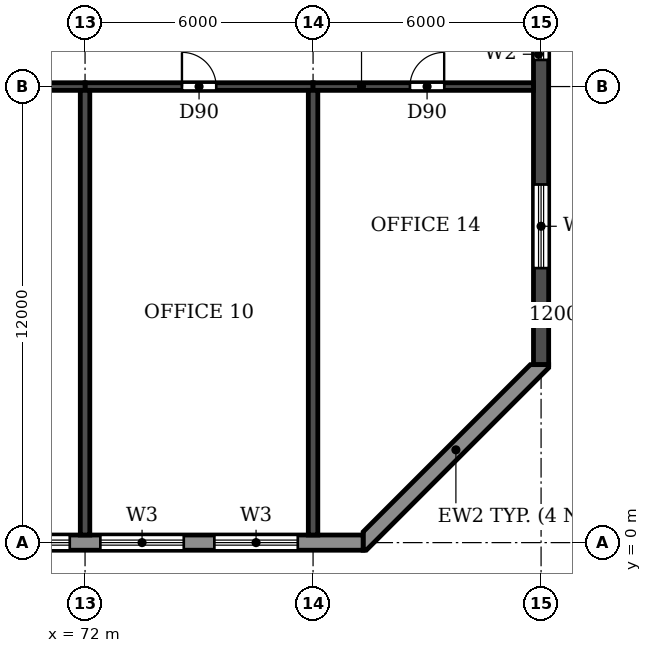
"""IFC4 building model, lengths in metres.
Left out: names, types, materials, properties, quantities, classifications, styles, units other than length and angle.
Written with IfcOpenShell. Run it as: python <this file> out.ifc"""

import sys

from ifc_helpers import new_model, si_unit, direction, frame, frame_2d, origin, place, context, subcontext, project, spatial, polyline, rectangle, outline, extrude, element, fill, save


model = new_model("IFC4")
c1 = context("Model", 3, precision=1e-05, world=origin(), true_north=direction((0.0, 1.0)))
c2 = subcontext(c1, "Body", "Model", "MODEL_VIEW")
j1 = project(units=[si_unit("LENGTHUNIT", "METRE"), si_unit("PLANEANGLEUNIT", "RADIAN")], contexts=[c1])
p1 = place(None, origin())
s1 = spatial("IfcSite", under=j1, at=p1, CompositionType="ELEMENT")
p2 = place(p1, origin())
s2 = spatial("IfcBuilding", under=s1, at=p2, CompositionType="ELEMENT")
p3 = place(p2, frame((0.0, 0.0, 261.0)))
s3 = spatial("IfcBuildingStorey", under=s2, at=p3, CompositionType="ELEMENT", Elevation=261.0)
for number, where, z_axis, x_axis in (
    (1, (72.0, 0.2, 0.0), (0.0, 0.0, 1.0), (0.0, 1.0, 0.0)),
    (2, (78.0, 0.2, 0.0), (0.0, 0.0, 1.0), (0.0, 1.0, 0.0)),
):
    element("IfcWall", number, at=place(p3, frame(where, z_axis=z_axis, x_axis=x_axis)), inside=s3, PredefinedType="SHEAR", context=c2, shape_type="SweptSolid", body=[
        extrude(rectangle(XDim=11.7, YDim=0.25, at=frame_2d((5.85, 0.0))), origin(), (0.0, 0.0, 1.0), 5.7),
    ])
p4 = place(p3, frame((84.0, 4.683, 0.0), z_axis=(0.0, 0.0, 1.0), x_axis=(0.0, 1.0, 0.0)))
e3 = element("IfcWall", 3, at=p4, inside=s3, PredefinedType="SHEAR", context=c2, shape_type="SweptSolid", body=[
    extrude(rectangle(XDim=31.834, YDim=0.4, at=frame_2d((15.917, 0.0))), origin(), (0.0, 0.0, 1.0), 5.7),
])
p5 = place(p4, frame((23.817, 0.0, 0.9)))
e4 = element("IfcOpeningElement", 4, at=p5, cuts=e3, PredefinedType="OPENING", context=c2, shape_type="SweptSolid", body=[
    extrude(rectangle(XDim=1.2, YDim=1.5, at=frame_2d((0.6, 0.75))), frame((0.0, 0.21, 0.0), z_axis=(0.0, -1.0, 0.0), x_axis=(1.0, 0.0, 0.0)), (0.0, 0.0, 1.0), 0.42),
])
p6 = place(p4, frame((8.017, 0.0, 0.9)))
e5 = element("IfcOpeningElement", 5, at=p6, cuts=e3, PredefinedType="OPENING", context=c2, shape_type="SweptSolid", body=[
    extrude(rectangle(XDim=1.2, YDim=1.5, at=frame_2d((0.6, 0.75))), frame((0.0, 0.21, 0.0), z_axis=(0.0, -1.0, 0.0), x_axis=(1.0, 0.0, 0.0)), (0.0, 0.0, 1.0), 0.42),
])
p7 = place(p4, frame((27.694, 0.0, 0.6)))
e6 = element("IfcOpeningElement", 6, at=p7, cuts=e3, PredefinedType="OPENING", context=c2, shape_type="SweptSolid", body=[
    extrude(rectangle(XDim=2.2, YDim=1.8, at=frame_2d((1.1, 0.9))), frame((0.0, 0.21, 0.0), z_axis=(0.0, -1.0, 0.0), x_axis=(1.0, 0.0, 0.0)), (0.0, 0.0, 1.0), 0.42),
])
p8 = place(p4, frame((2.541, 0.0, 0.6)))
e7 = element("IfcOpeningElement", 7, at=p8, cuts=e3, PredefinedType="OPENING", context=c2, shape_type="SweptSolid", body=[
    extrude(rectangle(XDim=2.2, YDim=1.8, at=frame_2d((1.1, 0.9))), frame((0.0, 0.21, 0.0), z_axis=(0.0, -1.0, 0.0), x_axis=(1.0, 0.0, 0.0)), (0.0, 0.0, 1.0), 0.42),
])
p9 = place(p4, frame((15.917, 0.0, 0.9)))
e8 = element("IfcOpeningElement", 8, at=p9, cuts=e3, PredefinedType="OPENING", context=c2, shape_type="SweptSolid", body=[
    extrude(rectangle(XDim=1.2, YDim=1.5, at=frame_2d((0.6, 0.75))), frame((0.0, 0.21, 0.0), z_axis=(0.0, -1.0, 0.0), x_axis=(1.0, 0.0, 0.0)), (0.0, 0.0, 1.0), 0.42),
])
p10 = place(p3, frame((66.0, 12.0, 0.0), z_axis=(0.0, 0.0, 1.0), x_axis=(1.0, 0.0, 0.0)))
e9 = element("IfcWall", 9, at=p10, inside=s3, PredefinedType="SHEAR", context=c2, shape_type="SweptSolid", body=[
    extrude(rectangle(XDim=6.0, YDim=0.2, at=frame_2d((3.0, 0.0))), origin(), (0.0, 0.0, 1.0), 5.1),
])
p11 = place(p10, frame((2.55, 0.0, 0.0)))
e10 = element("IfcOpeningElement", 10, at=p11, cuts=e9, PredefinedType="OPENING", context=c2, shape_type="SweptSolid", body=[
    extrude(rectangle(XDim=0.9, YDim=2.1, at=frame_2d((0.45, 1.05))), frame((0.0, 0.11, 0.0), z_axis=(0.0, -1.0, 0.0), x_axis=(1.0, 0.0, 0.0)), (0.0, 0.0, 1.0), 0.22),
])
p12 = place(p3, frame((72.0, 12.0, 0.0), z_axis=(0.0, 0.0, 1.0), x_axis=(1.0, 0.0, 0.0)))
e11 = element("IfcWall", 11, at=p12, inside=s3, PredefinedType="SHEAR", context=c2, shape_type="SweptSolid", body=[
    extrude(rectangle(XDim=6.0, YDim=0.2, at=frame_2d((3.0, 0.0))), origin(), (0.0, 0.0, 1.0), 5.1),
])
p13 = place(p12, frame((2.55, 0.0, 0.0)))
e12 = element("IfcOpeningElement", 12, at=p13, cuts=e11, PredefinedType="OPENING", context=c2, shape_type="SweptSolid", body=[
    extrude(rectangle(XDim=0.9, YDim=2.1, at=frame_2d((0.45, 1.05))), frame((0.0, 0.11, 0.0), z_axis=(0.0, -1.0, 0.0), x_axis=(1.0, 0.0, 0.0)), (0.0, 0.0, 1.0), 0.22),
])
p14 = place(p3, frame((78.0, 12.0, 0.0), z_axis=(0.0, 0.0, 1.0), x_axis=(1.0, 0.0, 0.0)))
e13 = element("IfcWall", 13, at=p14, inside=s3, PredefinedType="SHEAR", context=c2, shape_type="SweptSolid", body=[
    extrude(rectangle(XDim=5.8, YDim=0.2, at=frame_2d((2.9, 0.0))), origin(), (0.0, 0.0, 1.0), 5.1),
])
p15 = place(p14, frame((2.55, 0.0, 0.0)))
e14 = element("IfcOpeningElement", 14, at=p15, cuts=e13, PredefinedType="OPENING", context=c2, shape_type="SweptSolid", body=[
    extrude(rectangle(XDim=0.9, YDim=2.1, at=frame_2d((0.45, 1.05))), frame((0.0, 0.11, 0.0), z_axis=(0.0, -1.0, 0.0), x_axis=(1.0, 0.0, 0.0)), (0.0, 0.0, 1.0), 0.22),
])
p16 = place(p3, frame((22.683, 0.0, 0.0), z_axis=(0.0, 0.0, 1.0), x_axis=(1.0, 0.0, 0.0)))
e15 = element("IfcWall", 15, at=p16, inside=s3, PredefinedType="STANDARD", context=c2, shape_type="SweptSolid", body=[
    extrude(rectangle(XDim=56.634, YDim=0.4, at=frame_2d((28.317, 0.0))), origin(), (0.0, 0.0, 1.0), 5.7),
])
p17 = place(p16, frame((1.717, 0.0, 0.6)))
e16 = element("IfcOpeningElement", 16, at=p17, cuts=e15, PredefinedType="OPENING", context=c2, shape_type="SweptSolid", body=[
    extrude(rectangle(XDim=2.2, YDim=1.8, at=frame_2d((1.1, 0.9))), frame((0.0, 0.21, 0.0), z_axis=(0.0, -1.0, 0.0), x_axis=(1.0, 0.0, 0.0)), (0.0, 0.0, 1.0), 0.42),
])
p18 = place(p16, frame((4.717, 0.0, 0.6)))
e17 = element("IfcOpeningElement", 17, at=p18, cuts=e15, PredefinedType="OPENING", context=c2, shape_type="SweptSolid", body=[
    extrude(rectangle(XDim=2.2, YDim=1.8, at=frame_2d((1.1, 0.9))), frame((0.0, 0.21, 0.0), z_axis=(0.0, -1.0, 0.0), x_axis=(1.0, 0.0, 0.0)), (0.0, 0.0, 1.0), 0.42),
])
p19 = place(p16, frame((25.717, 0.0, 0.6)))
e18 = element("IfcOpeningElement", 18, at=p19, cuts=e15, PredefinedType="OPENING", context=c2, shape_type="SweptSolid", body=[
    extrude(rectangle(XDim=2.2, YDim=1.8, at=frame_2d((1.1, 0.9))), frame((0.0, 0.21, 0.0), z_axis=(0.0, -1.0, 0.0), x_axis=(1.0, 0.0, 0.0)), (0.0, 0.0, 1.0), 0.42),
])
p20 = place(p16, frame((28.717, 0.0, 0.6)))
e19 = element("IfcOpeningElement", 19, at=p20, cuts=e15, PredefinedType="OPENING", context=c2, shape_type="SweptSolid", body=[
    extrude(rectangle(XDim=2.2, YDim=1.8, at=frame_2d((1.1, 0.9))), frame((0.0, 0.21, 0.0), z_axis=(0.0, -1.0, 0.0), x_axis=(1.0, 0.0, 0.0)), (0.0, 0.0, 1.0), 0.42),
])
p21 = place(p16, frame((31.717, 0.0, 0.6)))
e20 = element("IfcOpeningElement", 20, at=p21, cuts=e15, PredefinedType="OPENING", context=c2, shape_type="SweptSolid", body=[
    extrude(rectangle(XDim=2.2, YDim=1.8, at=frame_2d((1.1, 0.9))), frame((0.0, 0.21, 0.0), z_axis=(0.0, -1.0, 0.0), x_axis=(1.0, 0.0, 0.0)), (0.0, 0.0, 1.0), 0.42),
])
p22 = place(p16, frame((34.717, 0.0, 0.6)))
e21 = element("IfcOpeningElement", 21, at=p22, cuts=e15, PredefinedType="OPENING", context=c2, shape_type="SweptSolid", body=[
    extrude(rectangle(XDim=2.2, YDim=1.8, at=frame_2d((1.1, 0.9))), frame((0.0, 0.21, 0.0), z_axis=(0.0, -1.0, 0.0), x_axis=(1.0, 0.0, 0.0)), (0.0, 0.0, 1.0), 0.42),
])
p23 = place(p16, frame((37.717, 0.0, 0.6)))
e22 = element("IfcOpeningElement", 22, at=p23, cuts=e15, PredefinedType="OPENING", context=c2, shape_type="SweptSolid", body=[
    extrude(rectangle(XDim=2.2, YDim=1.8, at=frame_2d((1.1, 0.9))), frame((0.0, 0.21, 0.0), z_axis=(0.0, -1.0, 0.0), x_axis=(1.0, 0.0, 0.0)), (0.0, 0.0, 1.0), 0.42),
])
p24 = place(p16, frame((40.717, 0.0, 0.6)))
e23 = element("IfcOpeningElement", 23, at=p24, cuts=e15, PredefinedType="OPENING", context=c2, shape_type="SweptSolid", body=[
    extrude(rectangle(XDim=2.2, YDim=1.8, at=frame_2d((1.1, 0.9))), frame((0.0, 0.21, 0.0), z_axis=(0.0, -1.0, 0.0), x_axis=(1.0, 0.0, 0.0)), (0.0, 0.0, 1.0), 0.42),
])
p25 = place(p16, frame((43.717, 0.0, 0.6)))
e24 = element("IfcOpeningElement", 24, at=p25, cuts=e15, PredefinedType="OPENING", context=c2, shape_type="SweptSolid", body=[
    extrude(rectangle(XDim=2.2, YDim=1.8, at=frame_2d((1.1, 0.9))), frame((0.0, 0.21, 0.0), z_axis=(0.0, -1.0, 0.0), x_axis=(1.0, 0.0, 0.0)), (0.0, 0.0, 1.0), 0.42),
])
p26 = place(p16, frame((46.717, 0.0, 0.6)))
e25 = element("IfcOpeningElement", 25, at=p26, cuts=e15, PredefinedType="OPENING", context=c2, shape_type="SweptSolid", body=[
    extrude(rectangle(XDim=2.2, YDim=1.8, at=frame_2d((1.1, 0.9))), frame((0.0, 0.21, 0.0), z_axis=(0.0, -1.0, 0.0), x_axis=(1.0, 0.0, 0.0)), (0.0, 0.0, 1.0), 0.42),
])
p27 = place(p16, frame((49.717, 0.0, 0.6)))
e26 = element("IfcOpeningElement", 26, at=p27, cuts=e15, PredefinedType="OPENING", context=c2, shape_type="SweptSolid", body=[
    extrude(rectangle(XDim=2.2, YDim=1.8, at=frame_2d((1.1, 0.9))), frame((0.0, 0.21, 0.0), z_axis=(0.0, -1.0, 0.0), x_axis=(1.0, 0.0, 0.0)), (0.0, 0.0, 1.0), 0.42),
])
p28 = place(p16, frame((52.717, 0.0, 0.6)))
e27 = element("IfcOpeningElement", 27, at=p28, cuts=e15, PredefinedType="OPENING", context=c2, shape_type="SweptSolid", body=[
    extrude(rectangle(XDim=2.2, YDim=1.8, at=frame_2d((1.1, 0.9))), frame((0.0, 0.21, 0.0), z_axis=(0.0, -1.0, 0.0), x_axis=(1.0, 0.0, 0.0)), (0.0, 0.0, 1.0), 0.42),
])
p29 = place(p3, origin())
e28 = element("IfcWall", 28, at=p29, inside=s3, PredefinedType="STANDARD", context=c2, shape_type="SweptSolid", body=[
    extrude(outline(polyline([(79.317, -0.2), (79.4, -0.2), (84.2, 4.6), (84.2, 4.683), (83.717, 4.683), (79.317, 0.283), (79.317, -0.2)])), origin(), (0.0, 0.0, 1.0), 5.7),
])
p30 = place(p26, origin())
e29 = element("IfcWindow", 29, at=p30, inside=s3, PartitioningType="DOUBLE_PANEL_HORIZONTAL", PredefinedType="WINDOW", context=c2, shape_type="SweptSolid", body=[
    extrude(rectangle(XDim=2.2, YDim=1.8, at=frame_2d((1.1, 0.9))), frame((0.0, 0.03, 0.0), z_axis=(0.0, -1.0, 0.0), x_axis=(1.0, 0.0, 0.0)), (0.0, 0.0, 1.0), 0.06),
])
fill(e25, e29)
p31 = place(p27, origin())
e30 = element("IfcWindow", 30, at=p31, inside=s3, PartitioningType="DOUBLE_PANEL_HORIZONTAL", PredefinedType="WINDOW", context=c2, shape_type="SweptSolid", body=[
    extrude(rectangle(XDim=2.2, YDim=1.8, at=frame_2d((1.1, 0.9))), frame((0.0, 0.03, 0.0), z_axis=(0.0, -1.0, 0.0), x_axis=(1.0, 0.0, 0.0)), (0.0, 0.0, 1.0), 0.06),
])
fill(e26, e30)
p32 = place(p28, origin())
e31 = element("IfcWindow", 31, at=p32, inside=s3, PartitioningType="DOUBLE_PANEL_HORIZONTAL", PredefinedType="WINDOW", context=c2, shape_type="SweptSolid", body=[
    extrude(rectangle(XDim=2.2, YDim=1.8, at=frame_2d((1.1, 0.9))), frame((0.0, 0.03, 0.0), z_axis=(0.0, -1.0, 0.0), x_axis=(1.0, 0.0, 0.0)), (0.0, 0.0, 1.0), 0.06),
])
fill(e27, e31)
p33 = place(p6, origin())
e32 = element("IfcWindow", 32, at=p33, inside=s3, PartitioningType="SINGLE_PANEL", PredefinedType="WINDOW", context=c2, shape_type="SweptSolid", body=[
    extrude(rectangle(XDim=1.2, YDim=1.5, at=frame_2d((0.6, 0.75))), frame((0.0, 0.03, 0.0), z_axis=(0.0, -1.0, 0.0), x_axis=(1.0, 0.0, 0.0)), (0.0, 0.0, 1.0), 0.06),
])
fill(e5, e32)
p34 = place(p8, origin())
e33 = element("IfcWindow", 33, at=p34, inside=s3, PartitioningType="DOUBLE_PANEL_HORIZONTAL", PredefinedType="WINDOW", context=c2, shape_type="SweptSolid", body=[
    extrude(rectangle(XDim=2.2, YDim=1.8, at=frame_2d((1.1, 0.9))), frame((0.0, 0.03, 0.0), z_axis=(0.0, -1.0, 0.0), x_axis=(1.0, 0.0, 0.0)), (0.0, 0.0, 1.0), 0.06),
])
fill(e7, e33)
p35 = place(p13, origin())
e34 = element("IfcDoor", 34, at=p35, inside=s3, OperationType="SINGLE_SWING_LEFT", PredefinedType="DOOR", context=c2, shape_type="SweptSolid", body=[
    extrude(rectangle(XDim=0.9, YDim=2.1, at=frame_2d((0.45, 1.05))), frame((0.0, 0.025, 0.0), z_axis=(0.0, -1.0, 0.0), x_axis=(1.0, 0.0, 0.0)), (0.0, 0.0, 1.0), 0.05),
])
fill(e12, e34)
p36 = place(p15, origin())
e35 = element("IfcDoor", 35, at=p36, inside=s3, OperationType="SINGLE_SWING_RIGHT", PredefinedType="DOOR", context=c2, shape_type="SweptSolid", body=[
    extrude(rectangle(XDim=0.9, YDim=2.1, at=frame_2d((0.45, 1.05))), frame((0.0, 0.025, 0.0), z_axis=(0.0, -1.0, 0.0), x_axis=(1.0, 0.0, 0.0)), (0.0, 0.0, 1.0), 0.05),
])
fill(e14, e35)
save(model, sys.argv[1])
